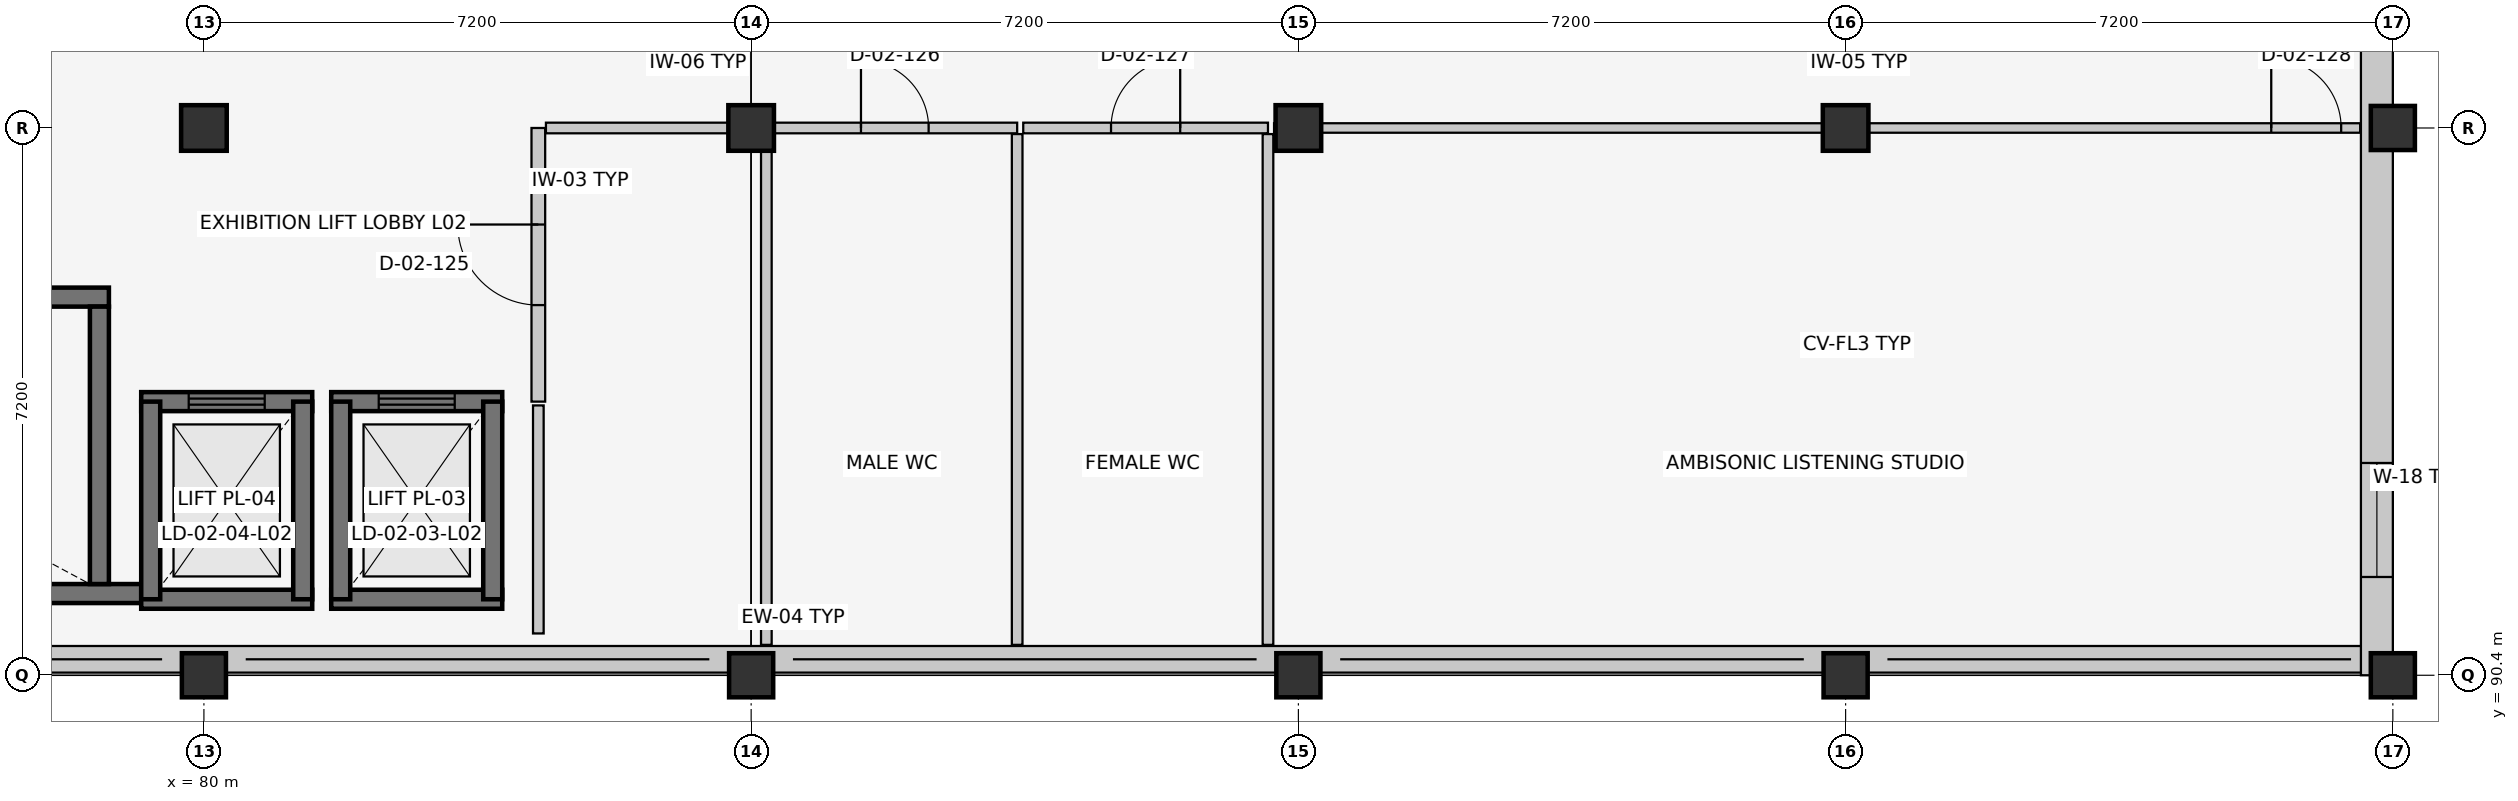
"""IFC4 building model, lengths in metres.
Left out: names, types, materials, properties, quantities, classifications, styles, units other than length and angle.
Written with IfcOpenShell. Run it as: python <this file> out.ifc"""

import sys

from ifc_helpers import new_model, si_unit, direction, frame, frame_2d, origin, origin_2d, place, context, subcontext, project, spatial, rectangle, extrude, element, fill, save


model = new_model("IFC4")
c1 = context("Model", 3, precision=1e-05, world=origin(), true_north=direction((0.0, 1.0)))
c2 = subcontext(c1, "Body", "Model", "MODEL_VIEW")
j1 = project(units=[si_unit("LENGTHUNIT", "METRE"), si_unit("PLANEANGLEUNIT", "RADIAN")], contexts=[c1])
p1 = place(None, origin())
s1 = spatial("IfcSite", under=j1, at=p1, CompositionType="ELEMENT")
p2 = place(p1, origin())
s2 = spatial("IfcBuilding", under=s1, at=p2, CompositionType="ELEMENT")
p3 = place(p2, frame((0.0, 0.0, 9.6)))
s3 = spatial("IfcBuildingStorey", under=s2, at=p3, CompositionType="ELEMENT", Elevation=9.6)
p4 = place(p3, frame((80.0, 90.4, 0.0), z_axis=(0.0, 0.0, 1.0), x_axis=(1.0, 0.0, 0.0)))
e1 = element("IfcColumn", 1, at=p4, inside=s3, PredefinedType="COLUMN", context=c2, shape_type="SweptSolid", body=[
    extrude(rectangle(XDim=0.58, YDim=0.58, at=origin_2d()), origin(), (0.0, 0.0, 1.0), 4.2),
])
p5 = place(p3, frame((80.0, 97.6, 0.0), z_axis=(0.0, 0.0, 1.0), x_axis=(1.0, 0.0, 0.0)))
e2 = element("IfcColumn", 2, at=p5, inside=s3, PredefinedType="COLUMN", context=c2, shape_type="SweptSolid", body=[
    extrude(rectangle(XDim=0.6, YDim=0.6, at=origin_2d()), origin(), (0.0, 0.0, 1.0), 4.2),
])
p6 = place(p3, frame((87.2, 90.4, 0.0), z_axis=(0.0, 0.0, 1.0), x_axis=(1.0, 0.0, 0.0)))
e3 = element("IfcColumn", 3, at=p6, inside=s3, PredefinedType="COLUMN", context=c2, shape_type="SweptSolid", body=[
    extrude(rectangle(XDim=0.58, YDim=0.58, at=origin_2d()), origin(), (0.0, 0.0, 1.0), 4.2),
])
p7 = place(p3, frame((87.2, 97.6, 0.0), z_axis=(0.0, 0.0, 1.0), x_axis=(1.0, 0.0, 0.0)))
e4 = element("IfcColumn", 4, at=p7, inside=s3, PredefinedType="COLUMN", context=c2, shape_type="SweptSolid", body=[
    extrude(rectangle(XDim=0.6, YDim=0.6, at=origin_2d()), origin(), (0.0, 0.0, 1.0), 4.2),
])
p8 = place(p3, frame((94.4, 90.4, 0.0), z_axis=(0.0, 0.0, 1.0), x_axis=(1.0, 0.0, 0.0)))
e5 = element("IfcColumn", 5, at=p8, inside=s3, PredefinedType="COLUMN", context=c2, shape_type="SweptSolid", body=[
    extrude(rectangle(XDim=0.58, YDim=0.58, at=origin_2d()), origin(), (0.0, 0.0, 1.0), 4.2),
])
p9 = place(p3, frame((94.4, 97.6, 0.0), z_axis=(0.0, 0.0, 1.0), x_axis=(1.0, 0.0, 0.0)))
e6 = element("IfcColumn", 6, at=p9, inside=s3, PredefinedType="COLUMN", context=c2, shape_type="SweptSolid", body=[
    extrude(rectangle(XDim=0.6, YDim=0.6, at=origin_2d()), origin(), (0.0, 0.0, 1.0), 4.2),
])
p10 = place(p3, frame((101.6, 90.4, 0.0), z_axis=(0.0, 0.0, 1.0), x_axis=(1.0, 0.0, 0.0)))
e7 = element("IfcColumn", 7, at=p10, inside=s3, PredefinedType="COLUMN", context=c2, shape_type="SweptSolid", body=[
    extrude(rectangle(XDim=0.58, YDim=0.58, at=origin_2d()), origin(), (0.0, 0.0, 1.0), 4.2),
])
p11 = place(p3, frame((101.6, 97.6, 0.0), z_axis=(0.0, 0.0, 1.0), x_axis=(1.0, 0.0, 0.0)))
e8 = element("IfcColumn", 8, at=p11, inside=s3, PredefinedType="COLUMN", context=c2, shape_type="SweptSolid", body=[
    extrude(rectangle(XDim=0.6, YDim=0.6, at=origin_2d()), origin(), (0.0, 0.0, 1.0), 4.2),
])
for number, where, z_axis, x_axis in (
    (9, (108.8, 90.4, 0.0), (0.0, 0.0, 1.0), (1.0, 0.0, 0.0)),
    (10, (108.8, 97.6, 0.0), (0.0, 0.0, 1.0), (1.0, 0.0, 0.0)),
):
    element("IfcColumn", number, at=place(p3, frame(where, z_axis=z_axis, x_axis=x_axis)), inside=s3, PredefinedType="COLUMN", context=c2, shape_type="SweptSolid", body=[
        extrude(rectangle(XDim=0.58, YDim=0.58, at=origin_2d()), origin(), (0.0, 0.0, 1.0), 4.2),
    ])
p12 = place(p3, frame((108.8, 90.61, 0.0), z_axis=(0.0, 0.0, 1.0), x_axis=(-1.0, 0.0, 0.0)))
e11 = element("IfcWall", 11, at=p12, inside=s3, PredefinedType="SOLIDWALL", context=c2, shape_type="SweptSolid", body=[
    extrude(rectangle(XDim=43.2, YDim=0.35, at=frame_2d((21.6, 0.0))), origin(), (0.0, 0.0, 1.0), 0.85),
])
p13 = place(p3, frame((108.59, 119.0, 0.0), z_axis=(0.0, 0.0, 1.0), x_axis=(0.0, -1.0, 0.0)))
e12 = element("IfcWall", 12, at=p13, inside=s3, PredefinedType="SOLIDWALL", context=c2, shape_type="SweptSolid", body=[
    extrude(rectangle(XDim=28.6, YDim=0.42, at=frame_2d((14.3, 0.0))), origin(), (0.0, 0.0, 1.0), 3.345),
])
p14 = place(p13, frame((1.318, 0.0, 0.9)))
e13 = element("IfcOpeningElement", 13, at=p14, cuts=e12, PredefinedType="OPENING", context=c2, shape_type="SweptSolid", body=[
    extrude(rectangle(XDim=1.45, YDim=1.45, at=frame_2d((0.725, 0.725))), frame((0.0, 0.222, 0.0), z_axis=(0.0, -1.0, 0.0), x_axis=(1.0, 0.0, 0.0)), (0.0, 0.0, 1.0), 0.444),
])
p15 = place(p13, frame((9.689, 0.0, 0.9)))
e14 = element("IfcOpeningElement", 14, at=p15, cuts=e12, PredefinedType="OPENING", context=c2, shape_type="SweptSolid", body=[
    extrude(rectangle(XDim=1.05, YDim=1.6, at=frame_2d((0.525, 0.8))), frame((0.0, 0.222, 0.0), z_axis=(0.0, -1.0, 0.0), x_axis=(1.0, 0.0, 0.0)), (0.0, 0.0, 1.0), 0.444),
])
p16 = place(p13, frame((25.807, 0.0, 0.9)))
e15 = element("IfcOpeningElement", 15, at=p16, cuts=e12, PredefinedType="OPENING", context=c2, shape_type="SweptSolid", body=[
    extrude(rectangle(XDim=1.5, YDim=1.6, at=frame_2d((0.75, 0.8))), frame((0.0, 0.222, 0.0), z_axis=(0.0, -1.0, 0.0), x_axis=(1.0, 0.0, 0.0)), (0.0, 0.0, 1.0), 0.444),
])
p17 = place(p3, frame((69.75, 91.475, 0.0), z_axis=(0.0, 0.0, 1.0), x_axis=(1.0, 0.0, 0.0)))
e16 = element("IfcWall", 16, at=p17, inside=s3, PredefinedType="SHEAR", context=c2, shape_type="SweptSolid", body=[
    extrude(rectangle(XDim=9.57, YDim=0.25, at=frame_2d((4.785, 0.0))), origin(), (0.0, 0.0, 1.0), 3.92),
])
p18 = place(p3, frame((78.75, 95.375, 0.0), z_axis=(0.0, 0.0, 1.0), x_axis=(-1.0, 0.0, 0.0)))
e17 = element("IfcWall", 17, at=p18, inside=s3, PredefinedType="SHEAR", context=c2, shape_type="SweptSolid", body=[
    extrude(rectangle(XDim=9.0, YDim=0.25, at=frame_2d((4.5, 0.0))), origin(), (0.0, 0.0, 1.0), 3.92),
])
p19 = place(p3, frame((78.625, 91.6, 0.0), z_axis=(0.0, 0.0, 1.0), x_axis=(0.0, 1.0, 0.0)))
e18 = element("IfcWall", 18, at=p19, inside=s3, PredefinedType="SHEAR", context=c2, shape_type="SweptSolid", body=[
    extrude(rectangle(XDim=3.65, YDim=0.25, at=frame_2d((1.825, 0.0))), origin(), (0.0, 0.0, 1.0), 3.92),
])
p20 = place(p3, frame((79.175, 91.4, 0.0), z_axis=(0.0, 0.0, 1.0), x_axis=(1.0, 0.0, 0.0)))
e19 = element("IfcWall", 19, at=p20, inside=s3, PredefinedType="SHEAR", context=c2, shape_type="SweptSolid", body=[
    extrude(rectangle(XDim=2.25, YDim=0.25, at=frame_2d((1.125, 0.0))), origin(), (0.0, 0.0, 1.0), 3.92),
])
p21 = place(p3, frame((81.425, 94.0, 0.0), z_axis=(0.0, 0.0, 1.0), x_axis=(-1.0, 0.0, 0.0)))
e20 = element("IfcWall", 20, at=p21, inside=s3, PredefinedType="SHEAR", context=c2, shape_type="SweptSolid", body=[
    extrude(rectangle(XDim=2.25, YDim=0.25, at=frame_2d((1.125, 0.0))), origin(), (0.0, 0.0, 1.0), 3.92),
])
p22 = place(p21, frame((0.625, 0.0, 0.0)))
e21 = element("IfcOpeningElement", 21, at=p22, cuts=e20, PredefinedType="OPENING", context=c2, shape_type="SweptSolid", body=[
    extrude(rectangle(XDim=1.0, YDim=2.15, at=frame_2d((0.5, 1.075))), frame((0.0, 0.137, 0.0), z_axis=(0.0, -1.0, 0.0), x_axis=(1.0, 0.0, 0.0)), (0.0, 0.0, 1.0), 0.274),
])
for number, where, z_axis, x_axis in (
    (22, (79.3, 94.0, 0.0), (0.0, 0.0, 1.0), (0.0, -1.0, 0.0)),
    (23, (81.3, 91.4, 0.0), (0.0, 0.0, 1.0), (0.0, 1.0, 0.0)),
):
    element("IfcWall", number, at=place(p3, frame(where, z_axis=z_axis, x_axis=x_axis)), inside=s3, PredefinedType="SHEAR", context=c2, shape_type="SweptSolid", body=[
        extrude(rectangle(XDim=2.6, YDim=0.25, at=frame_2d((1.3, 0.0))), origin(), (0.0, 0.0, 1.0), 3.92),
    ])
p23 = place(p3, frame((81.675, 91.4, 0.0), z_axis=(0.0, 0.0, 1.0), x_axis=(1.0, 0.0, 0.0)))
e24 = element("IfcWall", 24, at=p23, inside=s3, PredefinedType="SHEAR", context=c2, shape_type="SweptSolid", body=[
    extrude(rectangle(XDim=2.25, YDim=0.25, at=frame_2d((1.125, 0.0))), origin(), (0.0, 0.0, 1.0), 3.92),
])
p24 = place(p3, frame((83.925, 94.0, 0.0), z_axis=(0.0, 0.0, 1.0), x_axis=(-1.0, 0.0, 0.0)))
e25 = element("IfcWall", 25, at=p24, inside=s3, PredefinedType="SHEAR", context=c2, shape_type="SweptSolid", body=[
    extrude(rectangle(XDim=2.25, YDim=0.25, at=frame_2d((1.125, 0.0))), origin(), (0.0, 0.0, 1.0), 3.92),
])
p25 = place(p24, frame((0.625, 0.0, 0.0)))
e26 = element("IfcOpeningElement", 26, at=p25, cuts=e25, PredefinedType="OPENING", context=c2, shape_type="SweptSolid", body=[
    extrude(rectangle(XDim=1.0, YDim=2.15, at=frame_2d((0.5, 1.075))), frame((0.0, 0.137, 0.0), z_axis=(0.0, -1.0, 0.0), x_axis=(1.0, 0.0, 0.0)), (0.0, 0.0, 1.0), 0.274),
])
for number, where, z_axis, x_axis in (
    (27, (81.8, 94.0, 0.0), (0.0, 0.0, 1.0), (0.0, -1.0, 0.0)),
    (28, (83.8, 91.4, 0.0), (0.0, 0.0, 1.0), (0.0, 1.0, 0.0)),
):
    element("IfcWall", number, at=place(p3, frame(where, z_axis=z_axis, x_axis=x_axis)), inside=s3, PredefinedType="SHEAR", context=c2, shape_type="SweptSolid", body=[
        extrude(rectangle(XDim=2.6, YDim=0.25, at=frame_2d((1.3, 0.0))), origin(), (0.0, 0.0, 1.0), 3.92),
    ])
p26 = place(p3, frame((84.4, 94.0, 0.0), z_axis=(0.0, 0.0, 1.0), x_axis=(0.0, 1.0, 0.0)))
e29 = element("IfcWall", 29, at=p26, inside=s3, PredefinedType="PARTITIONING", context=c2, shape_type="SweptSolid", body=[
    extrude(rectangle(XDim=3.6, YDim=0.18, at=frame_2d((1.8, 0.0))), origin(), (0.0, 0.0, 1.0), 3.92),
])
p27 = place(p26, frame((1.27, 0.0, 0.0)))
e30 = element("IfcOpeningElement", 30, at=p27, cuts=e29, PredefinedType="OPENING", context=c2, shape_type="SweptSolid", body=[
    extrude(rectangle(XDim=1.06, YDim=2.1, at=frame_2d((0.53, 1.05))), frame((0.0, 0.102, 0.0), z_axis=(0.0, -1.0, 0.0), x_axis=(1.0, 0.0, 0.0)), (0.0, 0.0, 1.0), 0.204),
])
p28 = place(p3, frame((84.5, 97.6, 0.0), z_axis=(0.0, 0.0, 1.0), x_axis=(1.0, 0.0, 0.0)))
e31 = element("IfcWall", 31, at=p28, inside=s3, PredefinedType="PARTITIONING", context=c2, shape_type="SweptSolid", body=[
    extrude(rectangle(XDim=2.9, YDim=0.14, at=frame_2d((1.45, 0.0))), origin(), (0.0, 0.0, 1.0), 3.095),
])
p29 = place(p3, frame((87.4, 90.8, 0.0), z_axis=(0.0, 0.0, 1.0), x_axis=(0.0, 1.0, 0.0)))
e32 = element("IfcWall", 32, at=p29, inside=s3, PredefinedType="PARTITIONING", context=c2, shape_type="SweptSolid", body=[
    extrude(rectangle(XDim=6.72, YDim=0.14, at=frame_2d((3.36, 0.0))), origin(), (0.0, 0.0, 1.0), 3.295),
])
p30 = place(p3, frame((87.48, 97.6, 0.0), z_axis=(0.0, 0.0, 1.0), x_axis=(1.0, 0.0, 0.0)))
e33 = element("IfcWall", 33, at=p30, inside=s3, PredefinedType="PARTITIONING", context=c2, shape_type="SweptSolid", body=[
    extrude(rectangle(XDim=3.22, YDim=0.14, at=frame_2d((1.61, 0.0))), origin(), (0.0, 0.0, 1.0), 3.045),
])
p31 = place(p30, frame((1.165, 0.0, 0.0)))
e34 = element("IfcOpeningElement", 34, at=p31, cuts=e33, PredefinedType="OPENING", context=c2, shape_type="SweptSolid", body=[
    extrude(rectangle(XDim=0.89, YDim=2.05, at=frame_2d((0.445, 1.025))), frame((0.0, 0.082, 0.0), z_axis=(0.0, -1.0, 0.0), x_axis=(1.0, 0.0, 0.0)), (0.0, 0.0, 1.0), 0.164),
])
p32 = place(p3, frame((90.7, 90.8, 0.0), z_axis=(0.0, 0.0, 1.0), x_axis=(0.0, 1.0, 0.0)))
e35 = element("IfcWall", 35, at=p32, inside=s3, PredefinedType="PARTITIONING", context=c2, shape_type="SweptSolid", body=[
    extrude(rectangle(XDim=6.72, YDim=0.14, at=frame_2d((3.36, 0.0))), origin(), (0.0, 0.0, 1.0), 3.495),
])
p33 = place(p3, frame((90.78, 97.6, 0.0), z_axis=(0.0, 0.0, 1.0), x_axis=(1.0, 0.0, 0.0)))
e36 = element("IfcWall", 36, at=p33, inside=s3, PredefinedType="PARTITIONING", context=c2, shape_type="SweptSolid", body=[
    extrude(rectangle(XDim=3.22, YDim=0.14, at=frame_2d((1.61, 0.0))), origin(), (0.0, 0.0, 1.0), 3.045),
])
p34 = place(p33, frame((1.155, 0.0, 0.0)))
e37 = element("IfcOpeningElement", 37, at=p34, cuts=e36, PredefinedType="OPENING", context=c2, shape_type="SweptSolid", body=[
    extrude(rectangle(XDim=0.91, YDim=2.06, at=frame_2d((0.455, 1.03))), frame((0.0, 0.082, 0.0), z_axis=(0.0, -1.0, 0.0), x_axis=(1.0, 0.0, 0.0)), (0.0, 0.0, 1.0), 0.164),
])
p35 = place(p3, frame((94.0, 90.8, 0.0), z_axis=(0.0, 0.0, 1.0), x_axis=(0.0, 1.0, 0.0)))
e38 = element("IfcWall", 38, at=p35, inside=s3, PredefinedType="PARTITIONING", context=c2, shape_type="SweptSolid", body=[
    extrude(rectangle(XDim=6.72, YDim=0.14, at=frame_2d((3.36, 0.0))), origin(), (0.0, 0.0, 1.0), 3.92),
])
p36 = place(p3, frame((94.08, 97.6, 0.0), z_axis=(0.0, 0.0, 1.0), x_axis=(1.0, 0.0, 0.0)))
e39 = element("IfcWall", 39, at=p36, inside=s3, PredefinedType="PARTITIONING", context=c2, shape_type="SweptSolid", body=[
    extrude(rectangle(XDim=14.29, YDim=0.125, at=frame_2d((7.145, 0.0))), origin(), (0.0, 0.0, 1.0), 3.235),
])
p37 = place(p36, frame((13.12, 0.0, 0.0)))
e40 = element("IfcOpeningElement", 40, at=p37, cuts=e39, PredefinedType="OPENING", context=c2, shape_type="SweptSolid", body=[
    extrude(rectangle(XDim=0.92, YDim=2.08, at=frame_2d((0.46, 1.04))), frame((0.0, 0.074, 0.0), z_axis=(0.0, -1.0, 0.0), x_axis=(1.0, 0.0, 0.0)), (0.0, 0.0, 1.0), 0.149),
])
p38 = place(p3, frame((84.4, 90.95, 0.0), z_axis=(0.0, 0.0, 1.0), x_axis=(0.0, 1.0, 0.0)))
e41 = element("IfcWall", 41, at=p38, inside=s3, PredefinedType="PARTITIONING", context=c2, shape_type="SweptSolid", body=[
    extrude(rectangle(XDim=3.0, YDim=0.14, at=frame_2d((1.5, 0.0))), origin(), (0.0, 0.0, 1.0), 3.92),
])
p39 = place(p16, origin())
e42 = element("IfcWindow", 42, at=p39, inside=s3, PartitioningType="SINGLE_PANEL", PredefinedType="WINDOW", context=c2, shape_type="SweptSolid", body=[
    extrude(rectangle(XDim=1.5, YDim=1.6, at=frame_2d((0.75, 0.8))), frame((0.0, 0.03, 0.0), z_axis=(0.0, -1.0, 0.0), x_axis=(1.0, 0.0, 0.0)), (0.0, 0.0, 1.0), 0.06),
])
fill(e15, e42)
p40 = place(p22, origin())
e43 = element("IfcDoor", 43, at=p40, inside=s3, OperationType="SLIDING_TO_LEFT", PredefinedType="DOOR", context=c2, shape_type="SweptSolid", body=[
    extrude(rectangle(XDim=1.0, YDim=2.15, at=frame_2d((0.5, 1.075))), frame((0.0, 0.025, 0.0), z_axis=(0.0, -1.0, 0.0), x_axis=(1.0, 0.0, 0.0)), (0.0, 0.0, 1.0), 0.05),
])
fill(e21, e43)
p41 = place(p25, origin())
e44 = element("IfcDoor", 44, at=p41, inside=s3, OperationType="SLIDING_TO_LEFT", PredefinedType="DOOR", context=c2, shape_type="SweptSolid", body=[
    extrude(rectangle(XDim=1.0, YDim=2.15, at=frame_2d((0.5, 1.075))), frame((0.0, 0.025, 0.0), z_axis=(0.0, -1.0, 0.0), x_axis=(1.0, 0.0, 0.0)), (0.0, 0.0, 1.0), 0.05),
])
fill(e26, e44)
p42 = place(p27, origin())
e45 = element("IfcDoor", 45, at=p42, inside=s3, OperationType="SINGLE_SWING_RIGHT", PredefinedType="DOOR", context=c2, shape_type="SweptSolid", body=[
    extrude(rectangle(XDim=1.06, YDim=2.1, at=frame_2d((0.53, 1.05))), frame((0.0, 0.025, 0.0), z_axis=(0.0, -1.0, 0.0), x_axis=(1.0, 0.0, 0.0)), (0.0, 0.0, 1.0), 0.05),
])
fill(e30, e45)
p43 = place(p31, origin())
e46 = element("IfcDoor", 46, at=p43, inside=s3, OperationType="SINGLE_SWING_LEFT", PredefinedType="DOOR", context=c2, shape_type="SweptSolid", body=[
    extrude(rectangle(XDim=0.89, YDim=2.05, at=frame_2d((0.445, 1.025))), frame((0.0, 0.025, 0.0), z_axis=(0.0, -1.0, 0.0), x_axis=(1.0, 0.0, 0.0)), (0.0, 0.0, 1.0), 0.05),
])
fill(e34, e46)
p44 = place(p34, origin())
e47 = element("IfcDoor", 47, at=p44, inside=s3, OperationType="SINGLE_SWING_RIGHT", PredefinedType="DOOR", context=c2, shape_type="SweptSolid", body=[
    extrude(rectangle(XDim=0.91, YDim=2.06, at=frame_2d((0.455, 1.03))), frame((0.0, 0.025, 0.0), z_axis=(0.0, -1.0, 0.0), x_axis=(1.0, 0.0, 0.0)), (0.0, 0.0, 1.0), 0.05),
])
fill(e37, e47)
p45 = place(p37, origin())
e48 = element("IfcDoor", 48, at=p45, inside=s3, OperationType="SINGLE_SWING_LEFT", PredefinedType="DOOR", context=c2, shape_type="SweptSolid", body=[
    extrude(rectangle(XDim=0.92, YDim=2.08, at=frame_2d((0.46, 1.04))), frame((0.0, 0.025, 0.0), z_axis=(0.0, -1.0, 0.0), x_axis=(1.0, 0.0, 0.0)), (0.0, 0.0, 1.0), 0.05),
])
fill(e40, e48)
save(model, sys.argv[1])
